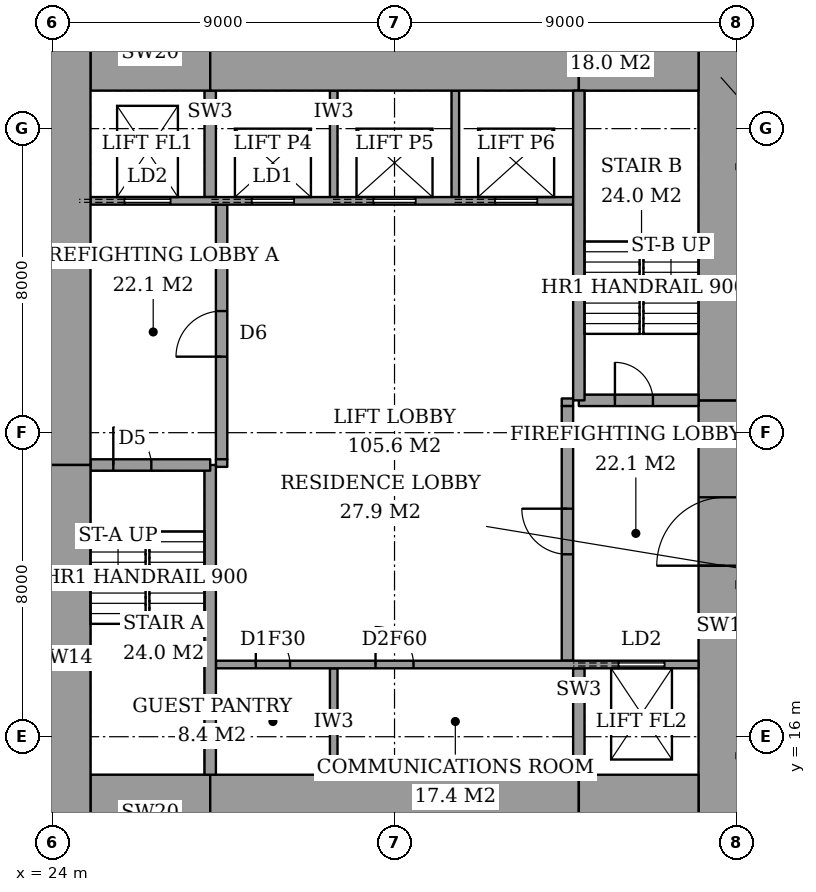
"""IFC4 building model, lengths in metres.
Left out: names, types, materials, properties, quantities, classifications, styles, units other than length and angle.
Written with IfcOpenShell. Run it as: python <this file> out.ifc"""

import sys

from ifc_helpers import new_model, si_unit, direction, frame, frame_2d, origin, place, context, subcontext, project, spatial, rectangle, extrude, element, fill, save


model = new_model("IFC4")
c1 = context("Model", 3, precision=1e-05, world=origin(), true_north=direction((0.0, 1.0)))
c2 = subcontext(c1, "Body", "Model", "MODEL_VIEW")
j1 = project(units=[si_unit("LENGTHUNIT", "METRE"), si_unit("PLANEANGLEUNIT", "RADIAN")], contexts=[c1])
p1 = place(None, origin())
s1 = spatial("IfcSite", under=j1, at=p1, CompositionType="ELEMENT")
p2 = place(p1, origin())
s2 = spatial("IfcBuilding", under=s1, at=p2, CompositionType="ELEMENT")
p3 = place(p2, frame((0.0, 0.0, 252.0)))
s3 = spatial("IfcBuildingStorey", under=s2, at=p3, CompositionType="ELEMENT", Elevation=252.0)
p4 = place(p3, frame((25.0, 14.0, 0.0), z_axis=(0.0, 0.0, 1.0), x_axis=(1.0, 0.0, 0.0)))
e1 = element("IfcWall", 1, at=p4, inside=s3, PredefinedType="SHEAR", context=c2, shape_type="SweptSolid", body=[
    extrude(rectangle(XDim=3.15, YDim=2.0, at=frame_2d((1.575, 0.0))), origin(), (0.0, 0.0, 1.0), 3.6),
])
p5 = place(p3, frame((28.15, 14.0, 0.0), z_axis=(0.0, 0.0, 1.0), x_axis=(1.0, 0.0, 0.0)))
e2 = element("IfcWall", 2, at=p5, inside=s3, PredefinedType="SHEAR", context=c2, shape_type="SweptSolid", body=[
    extrude(rectangle(XDim=9.7, YDim=2.0, at=frame_2d((4.85, 0.0))), origin(), (0.0, 0.0, 1.0), 3.6),
])
for number, where, z_axis, x_axis in (
    (3, (37.85, 14.0, 0.0), (0.0, 0.0, 1.0), (1.0, 0.0, 0.0)),
    (4, (25.0, 34.0, 0.0), (0.0, 0.0, 1.0), (1.0, 0.0, 0.0)),
):
    element("IfcWall", number, at=place(p3, frame(where, z_axis=z_axis, x_axis=x_axis)), inside=s3, PredefinedType="SHEAR", context=c2, shape_type="SweptSolid", body=[
        extrude(rectangle(XDim=3.15, YDim=2.0, at=frame_2d((1.575, 0.0))), origin(), (0.0, 0.0, 1.0), 3.6),
    ])
p6 = place(p3, frame((28.15, 34.0, 0.0), z_axis=(0.0, 0.0, 1.0), x_axis=(1.0, 0.0, 0.0)))
e5 = element("IfcWall", 5, at=p6, inside=s3, PredefinedType="SHEAR", context=c2, shape_type="SweptSolid", body=[
    extrude(rectangle(XDim=9.7, YDim=2.0, at=frame_2d((4.85, 0.0))), origin(), (0.0, 0.0, 1.0), 3.6),
])
p7 = place(p3, frame((37.85, 34.0, 0.0), z_axis=(0.0, 0.0, 1.0), x_axis=(1.0, 0.0, 0.0)))
e6 = element("IfcWall", 6, at=p7, inside=s3, PredefinedType="SHEAR", context=c2, shape_type="SweptSolid", body=[
    extrude(rectangle(XDim=3.15, YDim=2.0, at=frame_2d((1.575, 0.0))), origin(), (0.0, 0.0, 1.0), 3.6),
])
p8 = place(p3, frame((24.3, 13.0, 0.0), z_axis=(0.0, 0.0, 1.0), x_axis=(0.0, 1.0, 0.0)))
e7 = element("IfcWall", 7, at=p8, inside=s3, PredefinedType="SHEAR", context=c2, shape_type="SweptSolid", body=[
    extrude(rectangle(XDim=10.15, YDim=1.4, at=frame_2d((5.075, 0.0))), origin(), (0.0, 0.0, 1.0), 3.6),
])
p9 = place(p3, frame((24.3, 23.15, 0.0), z_axis=(0.0, 0.0, 1.0), x_axis=(0.0, 1.0, 0.0)))
e8 = element("IfcWall", 8, at=p9, inside=s3, PredefinedType="SHEAR", context=c2, shape_type="SweptSolid", body=[
    extrude(rectangle(XDim=11.85, YDim=1.4, at=frame_2d((5.925, 0.0))), origin(), (0.0, 0.0, 1.0), 3.6),
])
p10 = place(p3, frame((41.7, 13.0, 0.0), z_axis=(0.0, 0.0, 1.0), x_axis=(0.0, 1.0, 0.0)))
e9 = element("IfcWall", 9, at=p10, inside=s3, PredefinedType="SHEAR", context=c2, shape_type="SweptSolid", body=[
    extrude(rectangle(XDim=11.85, YDim=1.4, at=frame_2d((5.925, 0.0))), origin(), (0.0, 0.0, 1.0), 3.6),
])
p11 = place(p10, frame((7.5, 0.0, 0.0)))
e10 = element("IfcOpeningElement", 10, at=p11, cuts=e9, PredefinedType="OPENING", context=c2, shape_type="SweptSolid", body=[
    extrude(rectangle(XDim=1.8, YDim=2.4, at=frame_2d((0.9, 1.2))), frame((0.0, 0.71, 0.0), z_axis=(0.0, -1.0, 0.0), x_axis=(1.0, 0.0, 0.0)), (0.0, 0.0, 1.0), 1.42),
])
p12 = place(p3, frame((41.7, 24.85, 0.0), z_axis=(0.0, 0.0, 1.0), x_axis=(0.0, 1.0, 0.0)))
e11 = element("IfcWall", 11, at=p12, inside=s3, PredefinedType="SHEAR", context=c2, shape_type="SweptSolid", body=[
    extrude(rectangle(XDim=10.15, YDim=1.4, at=frame_2d((5.075, 0.0))), origin(), (0.0, 0.0, 1.0), 3.6),
])
p13 = place(p3, frame((28.15, 15.0, 0.0), z_axis=(0.0, 0.0, 1.0), x_axis=(0.0, 1.0, 0.0)))
e12 = element("IfcWall", 12, at=p13, inside=s3, PredefinedType="SHEAR", context=c2, shape_type="SweptSolid", body=[
    extrude(rectangle(XDim=8.15, YDim=0.3, at=frame_2d((4.075, 0.0))), origin(), (0.0, 0.0, 1.0), 3.6),
])
p14 = place(p3, frame((25.0, 23.15, 0.0), z_axis=(0.0, 0.0, 1.0), x_axis=(1.0, 0.0, 0.0)))
e13 = element("IfcWall", 13, at=p14, inside=s3, PredefinedType="SHEAR", context=c2, shape_type="SweptSolid", body=[
    extrude(rectangle(XDim=3.15, YDim=0.3, at=frame_2d((1.575, 0.0))), origin(), (0.0, 0.0, 1.0), 3.6),
])
p15 = place(p14, frame((0.6, 0.0, 0.0)))
e14 = element("IfcOpeningElement", 14, at=p15, cuts=e13, PredefinedType="OPENING", context=c2, shape_type="SweptSolid", body=[
    extrude(rectangle(XDim=1.0, YDim=2.1, at=frame_2d((0.5, 1.05))), frame((0.0, 0.16, 0.0), z_axis=(0.0, -1.0, 0.0), x_axis=(1.0, 0.0, 0.0)), (0.0, 0.0, 1.0), 0.32),
])
p16 = place(p3, frame((37.85, 24.85, 0.0), z_axis=(0.0, 0.0, 1.0), x_axis=(0.0, 1.0, 0.0)))
e15 = element("IfcWall", 15, at=p16, inside=s3, PredefinedType="SHEAR", context=c2, shape_type="SweptSolid", body=[
    extrude(rectangle(XDim=8.15, YDim=0.3, at=frame_2d((4.075, 0.0))), origin(), (0.0, 0.0, 1.0), 3.6),
])
p17 = place(p3, frame((37.85, 24.85, 0.0), z_axis=(0.0, 0.0, 1.0), x_axis=(1.0, 0.0, 0.0)))
e16 = element("IfcWall", 16, at=p17, inside=s3, PredefinedType="SHEAR", context=c2, shape_type="SweptSolid", body=[
    extrude(rectangle(XDim=3.15, YDim=0.3, at=frame_2d((1.575, 0.0))), origin(), (0.0, 0.0, 1.0), 3.6),
])
p18 = place(p17, frame((0.95, 0.0, 0.0)))
e17 = element("IfcOpeningElement", 17, at=p18, cuts=e16, PredefinedType="OPENING", context=c2, shape_type="SweptSolid", body=[
    extrude(rectangle(XDim=1.0, YDim=2.1, at=frame_2d((0.5, 1.05))), frame((0.0, 0.16, 0.0), z_axis=(0.0, -1.0, 0.0), x_axis=(1.0, 0.0, 0.0)), (0.0, 0.0, 1.0), 0.32),
])
p19 = place(p3, frame((28.45, 23.3, 0.0), z_axis=(0.0, 0.0, 1.0), x_axis=(0.0, 1.0, 0.0)))
e18 = element("IfcWall", 18, at=p19, inside=s3, PredefinedType="PARTITIONING", context=c2, shape_type="SweptSolid", body=[
    extrude(rectangle(XDim=6.7, YDim=0.3, at=frame_2d((3.35, 0.0))), origin(), (0.0, 0.0, 1.0), 3.6),
])
p20 = place(p19, frame((2.7, 0.0, 0.0)))
e19 = element("IfcOpeningElement", 19, at=p20, cuts=e18, PredefinedType="OPENING", context=c2, shape_type="SweptSolid", body=[
    extrude(rectangle(XDim=1.2, YDim=2.1, at=frame_2d((0.6, 1.05))), frame((0.0, 0.16, 0.0), z_axis=(0.0, -1.0, 0.0), x_axis=(1.0, 0.0, 0.0)), (0.0, 0.0, 1.0), 0.32),
])
p21 = place(p3, frame((37.55, 18.0, 0.0), z_axis=(0.0, 0.0, 1.0), x_axis=(0.0, 1.0, 0.0)))
e20 = element("IfcWall", 20, at=p21, inside=s3, PredefinedType="PARTITIONING", context=c2, shape_type="SweptSolid", body=[
    extrude(rectangle(XDim=6.7, YDim=0.3, at=frame_2d((3.35, 0.0))), origin(), (0.0, 0.0, 1.0), 3.6),
])
p22 = place(p21, frame((2.8, 0.0, 0.0)))
e21 = element("IfcOpeningElement", 21, at=p22, cuts=e20, PredefinedType="OPENING", context=c2, shape_type="SweptSolid", body=[
    extrude(rectangle(XDim=1.2, YDim=2.1, at=frame_2d((0.6, 1.05))), frame((0.0, 0.16, 0.0), z_axis=(0.0, -1.0, 0.0), x_axis=(1.0, 0.0, 0.0)), (0.0, 0.0, 1.0), 0.32),
])
p23 = place(p3, frame((28.3, 17.9, 0.0), z_axis=(0.0, 0.0, 1.0), x_axis=(1.0, 0.0, 0.0)))
e22 = element("IfcWall", 22, at=p23, inside=s3, PredefinedType="PARTITIONING", context=c2, shape_type="SweptSolid", body=[
    extrude(rectangle(XDim=12.7, YDim=0.2, at=frame_2d((6.35, 0.0))), origin(), (0.0, 0.0, 1.0), 3.6),
])
p24 = place(p23, frame((1.05, 0.0, 0.0)))
e23 = element("IfcOpeningElement", 23, at=p24, cuts=e22, PredefinedType="OPENING", context=c2, shape_type="SweptSolid", body=[
    extrude(rectangle(XDim=0.9, YDim=2.1, at=frame_2d((0.45, 1.05))), frame((0.0, 0.11, 0.0), z_axis=(0.0, -1.0, 0.0), x_axis=(1.0, 0.0, 0.0)), (0.0, 0.0, 1.0), 0.22),
])
p25 = place(p23, frame((4.2, 0.0, 0.0)))
e24 = element("IfcOpeningElement", 24, at=p25, cuts=e22, PredefinedType="OPENING", context=c2, shape_type="SweptSolid", body=[
    extrude(rectangle(XDim=1.0, YDim=2.1, at=frame_2d((0.5, 1.05))), frame((0.0, 0.11, 0.0), z_axis=(0.0, -1.0, 0.0), x_axis=(1.0, 0.0, 0.0)), (0.0, 0.0, 1.0), 0.22),
])
p26 = place(p23, frame((10.6, 0.0, 0.0)))
e25 = element("IfcOpeningElement", 25, at=p26, cuts=e22, PredefinedType="OPENING", context=c2, shape_type="SweptSolid", body=[
    extrude(rectangle(XDim=1.2, YDim=2.1, at=frame_2d((0.6, 1.05))), frame((0.0, 0.11, 0.0), z_axis=(0.0, -1.0, 0.0), x_axis=(1.0, 0.0, 0.0)), (0.0, 0.0, 1.0), 0.22),
])
p27 = place(p3, frame((25.0, 30.1, 0.0), z_axis=(0.0, 0.0, 1.0), x_axis=(1.0, 0.0, 0.0)))
e26 = element("IfcWall", 26, at=p27, inside=s3, PredefinedType="PARTITIONING", context=c2, shape_type="SweptSolid", body=[
    extrude(rectangle(XDim=12.7, YDim=0.2, at=frame_2d((6.35, 0.0))), origin(), (0.0, 0.0, 1.0), 3.6),
])
p28 = place(p27, frame((4.25, 0.0, 0.0)))
e27 = element("IfcOpeningElement", 27, at=p28, cuts=e26, PredefinedType="OPENING", context=c2, shape_type="SweptSolid", body=[
    extrude(rectangle(XDim=1.1, YDim=2.1, at=frame_2d((0.55, 1.05))), frame((0.0, 0.11, 0.0), z_axis=(0.0, -1.0, 0.0), x_axis=(1.0, 0.0, 0.0)), (0.0, 0.0, 1.0), 0.22),
])
p29 = place(p27, frame((7.45, 0.0, 0.0)))
e28 = element("IfcOpeningElement", 28, at=p29, cuts=e26, PredefinedType="OPENING", context=c2, shape_type="SweptSolid", body=[
    extrude(rectangle(XDim=1.1, YDim=2.1, at=frame_2d((0.55, 1.05))), frame((0.0, 0.11, 0.0), z_axis=(0.0, -1.0, 0.0), x_axis=(1.0, 0.0, 0.0)), (0.0, 0.0, 1.0), 0.22),
])
p30 = place(p27, frame((10.65, 0.0, 0.0)))
e29 = element("IfcOpeningElement", 29, at=p30, cuts=e26, PredefinedType="OPENING", context=c2, shape_type="SweptSolid", body=[
    extrude(rectangle(XDim=1.1, YDim=2.1, at=frame_2d((0.55, 1.05))), frame((0.0, 0.11, 0.0), z_axis=(0.0, -1.0, 0.0), x_axis=(1.0, 0.0, 0.0)), (0.0, 0.0, 1.0), 0.22),
])
p31 = place(p27, frame((0.9, 0.0, 0.0)))
e30 = element("IfcOpeningElement", 30, at=p31, cuts=e26, PredefinedType="OPENING", context=c2, shape_type="SweptSolid", body=[
    extrude(rectangle(XDim=1.2, YDim=2.1, at=frame_2d((0.6, 1.05))), frame((0.0, 0.11, 0.0), z_axis=(0.0, -1.0, 0.0), x_axis=(1.0, 0.0, 0.0)), (0.0, 0.0, 1.0), 0.22),
])
p32 = place(p3, frame((31.4, 15.0, 0.0), z_axis=(0.0, 0.0, 1.0), x_axis=(0.0, 1.0, 0.0)))
e31 = element("IfcWall", 31, at=p32, inside=s3, PredefinedType="PARTITIONING", context=c2, shape_type="SweptSolid", body=[
    extrude(rectangle(XDim=2.8, YDim=0.2, at=frame_2d((1.4, 0.0))), origin(), (0.0, 0.0, 1.0), 3.6),
])
p33 = place(p3, frame((37.85, 15.0, 0.0), z_axis=(0.0, 0.0, 1.0), x_axis=(0.0, 1.0, 0.0)))
e32 = element("IfcWall", 32, at=p33, inside=s3, PredefinedType="SHEAR", context=c2, shape_type="SweptSolid", body=[
    extrude(rectangle(XDim=2.8, YDim=0.3, at=frame_2d((1.4, 0.0))), origin(), (0.0, 0.0, 1.0), 3.6),
])
for number, where, z_axis, x_axis in (
    (33, (31.4, 30.2, 0.0), (0.0, 0.0, 1.0), (0.0, 1.0, 0.0)),
    (34, (34.6, 30.2, 0.0), (0.0, 0.0, 1.0), (0.0, 1.0, 0.0)),
):
    element("IfcWall", number, at=place(p3, frame(where, z_axis=z_axis, x_axis=x_axis)), inside=s3, PredefinedType="PARTITIONING", context=c2, shape_type="SweptSolid", body=[
        extrude(rectangle(XDim=2.8, YDim=0.2, at=frame_2d((1.4, 0.0))), origin(), (0.0, 0.0, 1.0), 3.6),
    ])
p34 = place(p3, frame((28.15, 30.2, 0.0), z_axis=(0.0, 0.0, 1.0), x_axis=(0.0, 1.0, 0.0)))
e35 = element("IfcWall", 35, at=p34, inside=s3, PredefinedType="SHEAR", context=c2, shape_type="SweptSolid", body=[
    extrude(rectangle(XDim=2.8, YDim=0.3, at=frame_2d((1.4, 0.0))), origin(), (0.0, 0.0, 1.0), 3.6),
])
for number, where, z_axis, x_axis in (
    (36, (28.3, 23.2, 0.0), (0.0, 0.0, 1.0), (1.0, 0.0, 0.0)),
    (37, (37.4, 24.8, 0.0), (0.0, 0.0, 1.0), (1.0, 0.0, 0.0)),
):
    element("IfcWall", number, at=place(p3, frame(where, z_axis=z_axis, x_axis=x_axis)), inside=s3, PredefinedType="PARTITIONING", context=c2, shape_type="SweptSolid", body=[
        extrude(rectangle(XDim=0.3, YDim=0.2, at=frame_2d((0.15, 0.0))), origin(), (0.0, 0.0, 1.0), 3.6),
    ])
p35 = place(p15, origin())
e38 = element("IfcDoor", 38, at=p35, inside=s3, OperationType="SINGLE_SWING_RIGHT", PredefinedType="DOOR", context=c2, shape_type="SweptSolid", body=[
    extrude(rectangle(XDim=1.0, YDim=2.1, at=frame_2d((0.5, 1.05))), frame((0.0, 0.025, 0.0), z_axis=(0.0, -1.0, 0.0), x_axis=(1.0, 0.0, 0.0)), (0.0, 0.0, 1.0), 0.05),
])
fill(e14, e38)
p36 = place(p18, origin())
e39 = element("IfcDoor", 39, at=p36, inside=s3, OperationType="SINGLE_SWING_RIGHT", PredefinedType="DOOR", context=c2, shape_type="SweptSolid", body=[
    extrude(rectangle(XDim=1.0, YDim=2.1, at=frame_2d((0.5, 1.05))), frame((0.0, 0.025, 0.0), z_axis=(0.0, -1.0, 0.0), x_axis=(1.0, 0.0, 0.0)), (0.0, 0.0, 1.0), 0.05),
])
fill(e17, e39)
p37 = place(p20, origin())
e40 = element("IfcDoor", 40, at=p37, inside=s3, OperationType="SINGLE_SWING_RIGHT", PredefinedType="DOOR", context=c2, shape_type="SweptSolid", body=[
    extrude(rectangle(XDim=1.2, YDim=2.1, at=frame_2d((0.6, 1.05))), frame((0.0, 0.025, 0.0), z_axis=(0.0, -1.0, 0.0), x_axis=(1.0, 0.0, 0.0)), (0.0, 0.0, 1.0), 0.05),
])
fill(e19, e40)
p38 = place(p22, origin())
e41 = element("IfcDoor", 41, at=p38, inside=s3, OperationType="SINGLE_SWING_LEFT", PredefinedType="DOOR", context=c2, shape_type="SweptSolid", body=[
    extrude(rectangle(XDim=1.2, YDim=2.1, at=frame_2d((0.6, 1.05))), frame((0.0, 0.025, 0.0), z_axis=(0.0, -1.0, 0.0), x_axis=(1.0, 0.0, 0.0)), (0.0, 0.0, 1.0), 0.05),
])
fill(e21, e41)
p39 = place(p11, origin())
e42 = element("IfcDoor", 42, at=p39, inside=s3, OperationType="DOUBLE_DOOR_DOUBLE_SWING", PredefinedType="DOOR", context=c2, shape_type="SweptSolid", body=[
    extrude(rectangle(XDim=1.8, YDim=2.4, at=frame_2d((0.9, 1.2))), frame((0.0, 0.025, 0.0), z_axis=(0.0, -1.0, 0.0), x_axis=(1.0, 0.0, 0.0)), (0.0, 0.0, 1.0), 0.05),
])
fill(e10, e42)
p40 = place(p24, origin())
e43 = element("IfcDoor", 43, at=p40, inside=s3, OperationType="SINGLE_SWING_RIGHT", PredefinedType="DOOR", context=c2, shape_type="SweptSolid", body=[
    extrude(rectangle(XDim=0.9, YDim=2.1, at=frame_2d((0.45, 1.05))), frame((0.0, 0.025, 0.0), z_axis=(0.0, -1.0, 0.0), x_axis=(1.0, 0.0, 0.0)), (0.0, 0.0, 1.0), 0.05),
])
fill(e23, e43)
p41 = place(p25, origin())
e44 = element("IfcDoor", 44, at=p41, inside=s3, OperationType="SINGLE_SWING_RIGHT", PredefinedType="DOOR", context=c2, shape_type="SweptSolid", body=[
    extrude(rectangle(XDim=1.0, YDim=2.1, at=frame_2d((0.5, 1.05))), frame((0.0, 0.025, 0.0), z_axis=(0.0, -1.0, 0.0), x_axis=(1.0, 0.0, 0.0)), (0.0, 0.0, 1.0), 0.05),
])
fill(e24, e44)
p42 = place(p28, origin())
e45 = element("IfcDoor", 45, at=p42, inside=s3, OperationType="SLIDING_TO_LEFT", PredefinedType="DOOR", context=c2, shape_type="SweptSolid", body=[
    extrude(rectangle(XDim=1.1, YDim=2.1, at=frame_2d((0.55, 1.05))), frame((0.0, 0.025, 0.0), z_axis=(0.0, -1.0, 0.0), x_axis=(1.0, 0.0, 0.0)), (0.0, 0.0, 1.0), 0.05),
])
fill(e27, e45)
p43 = place(p29, origin())
e46 = element("IfcDoor", 46, at=p43, inside=s3, OperationType="SLIDING_TO_LEFT", PredefinedType="DOOR", context=c2, shape_type="SweptSolid", body=[
    extrude(rectangle(XDim=1.1, YDim=2.1, at=frame_2d((0.55, 1.05))), frame((0.0, 0.025, 0.0), z_axis=(0.0, -1.0, 0.0), x_axis=(1.0, 0.0, 0.0)), (0.0, 0.0, 1.0), 0.05),
])
fill(e28, e46)
p44 = place(p30, origin())
e47 = element("IfcDoor", 47, at=p44, inside=s3, OperationType="SLIDING_TO_LEFT", PredefinedType="DOOR", context=c2, shape_type="SweptSolid", body=[
    extrude(rectangle(XDim=1.1, YDim=2.1, at=frame_2d((0.55, 1.05))), frame((0.0, 0.025, 0.0), z_axis=(0.0, -1.0, 0.0), x_axis=(1.0, 0.0, 0.0)), (0.0, 0.0, 1.0), 0.05),
])
fill(e29, e47)
p45 = place(p31, origin())
e48 = element("IfcDoor", 48, at=p45, inside=s3, OperationType="SLIDING_TO_LEFT", PredefinedType="DOOR", context=c2, shape_type="SweptSolid", body=[
    extrude(rectangle(XDim=1.2, YDim=2.1, at=frame_2d((0.6, 1.05))), frame((0.0, 0.025, 0.0), z_axis=(0.0, -1.0, 0.0), x_axis=(1.0, 0.0, 0.0)), (0.0, 0.0, 1.0), 0.05),
])
fill(e30, e48)
p46 = place(p26, origin())
e49 = element("IfcDoor", 49, at=p46, inside=s3, OperationType="SLIDING_TO_LEFT", PredefinedType="DOOR", context=c2, shape_type="SweptSolid", body=[
    extrude(rectangle(XDim=1.2, YDim=2.1, at=frame_2d((0.6, 1.05))), frame((0.0, 0.025, 0.0), z_axis=(0.0, -1.0, 0.0), x_axis=(1.0, 0.0, 0.0)), (0.0, 0.0, 1.0), 0.05),
])
fill(e25, e49)
save(model, sys.argv[1])
